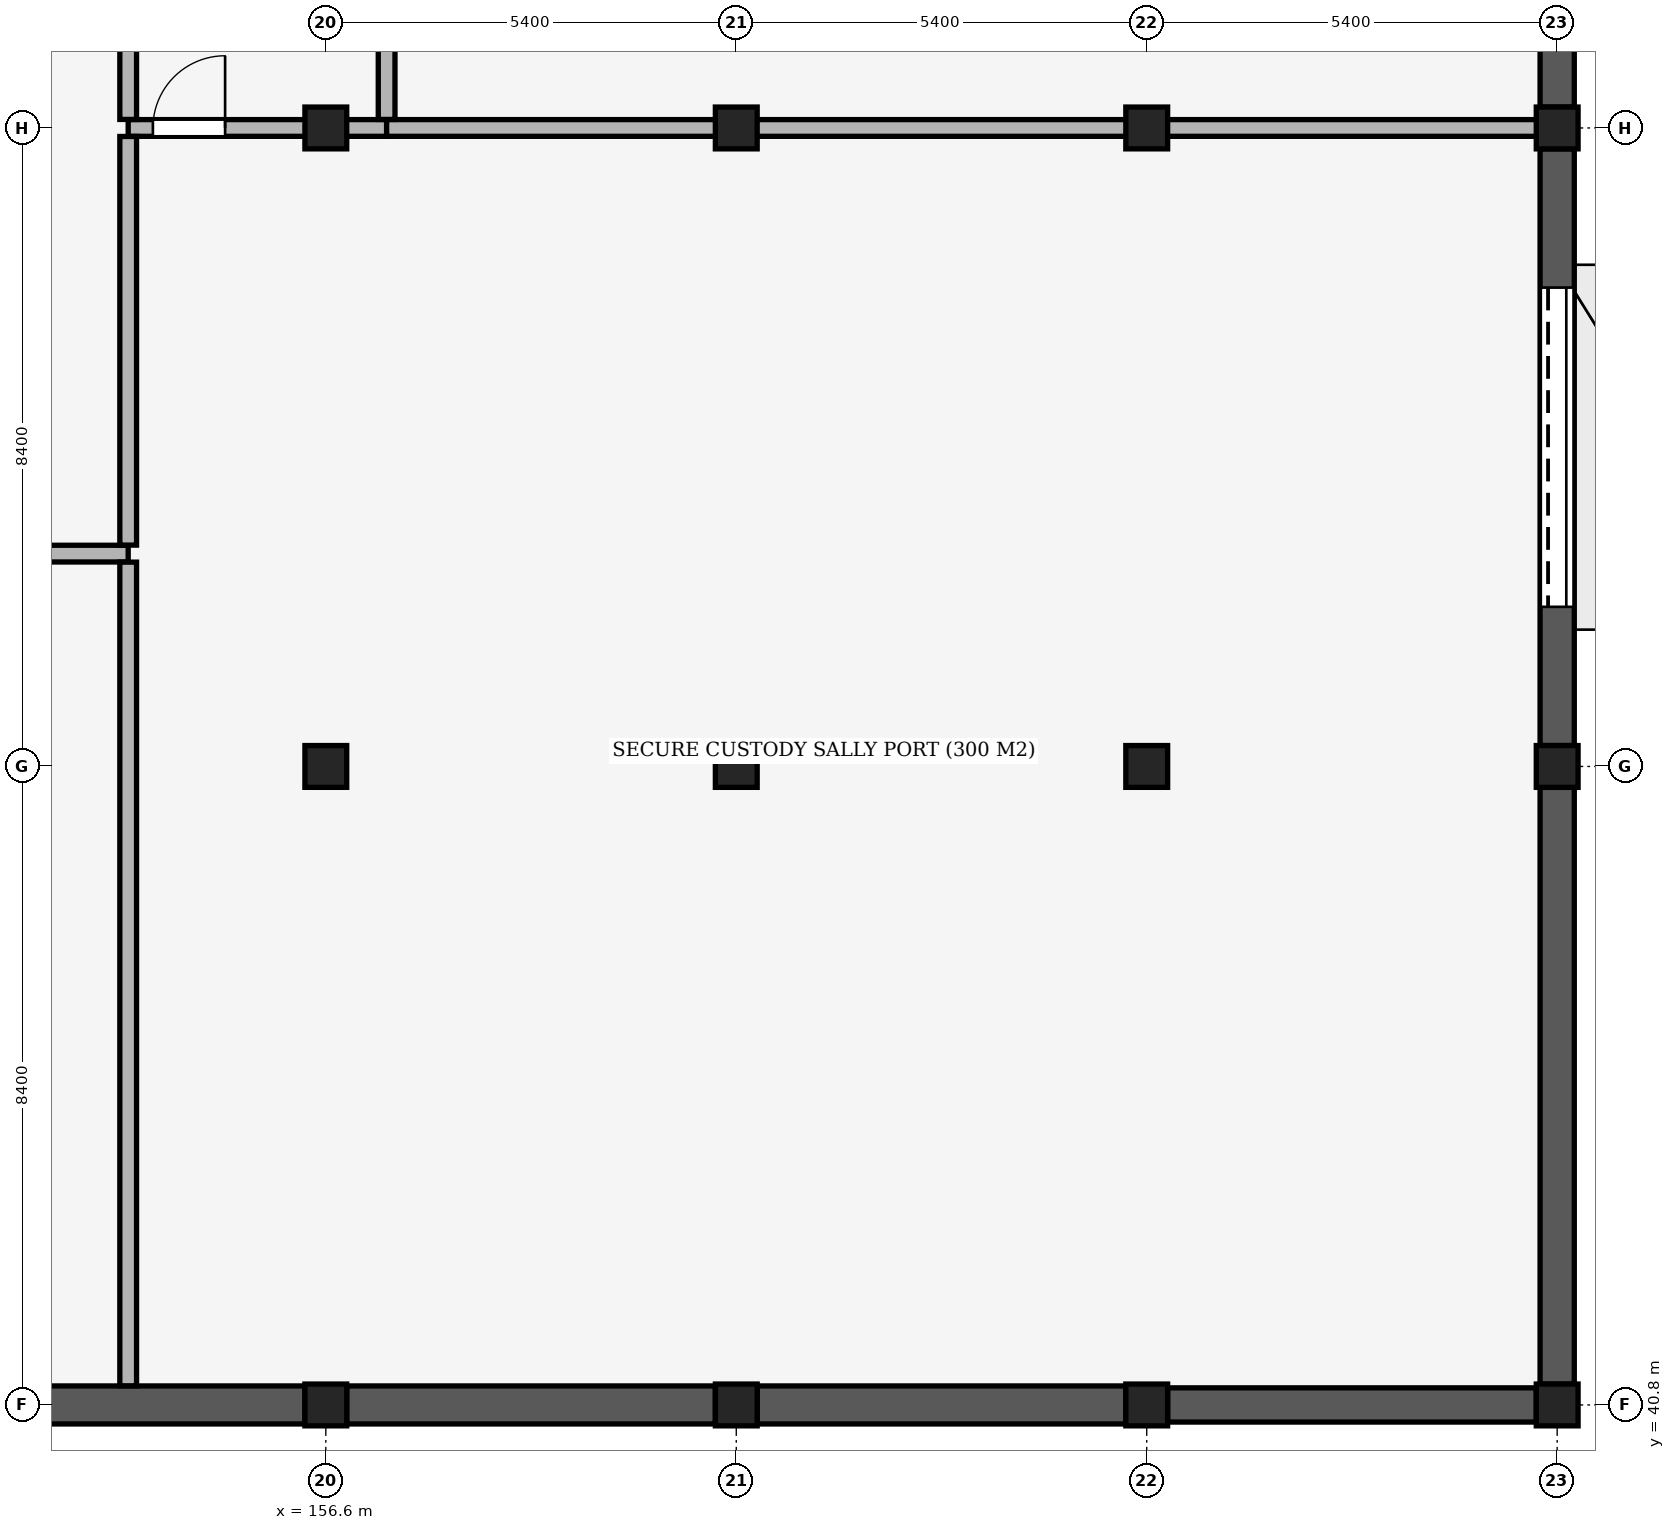
"""IFC4 building model, lengths in metres.
Left out: names, types, materials, properties, quantities, classifications, styles, units other than length and angle.
Written with IfcOpenShell. Run it as: python <this file> out.ifc"""

import sys

from ifc_helpers import new_model, si_unit, direction, frame, frame_2d, origin, origin_2d, place, context, subcontext, project, spatial, rectangle, extrude, element, fill, save


model = new_model("IFC4")
c1 = context("Model", 3, precision=1e-05, world=origin(), true_north=direction((0.0, 1.0)))
c2 = subcontext(c1, "Body", "Model", "MODEL_VIEW")
j1 = project(units=[si_unit("LENGTHUNIT", "METRE"), si_unit("PLANEANGLEUNIT", "RADIAN")], contexts=[c1])
p1 = place(None, origin())
s1 = spatial("IfcSite", under=j1, at=p1, CompositionType="ELEMENT")
p2 = place(p1, origin())
s2 = spatial("IfcBuilding", under=s1, at=p2, CompositionType="ELEMENT")
p3 = place(p2, frame((0.0, 0.0, -4.8)))
s3 = spatial("IfcBuildingStorey", under=s2, at=p3, CompositionType="ELEMENT", Elevation=-4.8)
for number, where, z_axis, x_axis in (
    (1, (156.6, 40.8, 0.0), (0.0, 0.0, 1.0), (1.0, 0.0, 0.0)),
    (2, (156.6, 49.2, 0.0), (0.0, 0.0, 1.0), (1.0, 0.0, 0.0)),
    (3, (156.6, 57.6, 0.0), (0.0, 0.0, 1.0), (1.0, 0.0, 0.0)),
    (4, (162.0, 40.8, 0.0), (0.0, 0.0, 1.0), (1.0, 0.0, 0.0)),
    (5, (162.0, 49.2, 0.0), (0.0, 0.0, 1.0), (1.0, 0.0, 0.0)),
    (6, (162.0, 57.6, 0.0), (0.0, 0.0, 1.0), (1.0, 0.0, 0.0)),
    (7, (167.4, 40.8, 0.0), (0.0, 0.0, 1.0), (1.0, 0.0, 0.0)),
    (8, (167.4, 49.2, 0.0), (0.0, 0.0, 1.0), (1.0, 0.0, 0.0)),
    (9, (167.4, 57.6, 0.0), (0.0, 0.0, 1.0), (1.0, 0.0, 0.0)),
    (10, (172.8, 40.8, 0.0), (0.0, 0.0, 1.0), (1.0, 0.0, 0.0)),
    (11, (172.8, 49.2, 0.0), (0.0, 0.0, 1.0), (1.0, 0.0, 0.0)),
    (12, (172.8, 57.6, 0.0), (0.0, 0.0, 1.0), (1.0, 0.0, 0.0)),
):
    element("IfcColumn", number, at=place(p3, frame(where, z_axis=z_axis, x_axis=x_axis)), inside=s3, PredefinedType="COLUMN", context=c2, shape_type="SweptSolid", body=[
        extrude(rectangle(XDim=0.55, YDim=0.55, at=origin_2d()), origin(), (0.0, 0.0, 1.0), 4.8),
    ])
p4 = place(p3, frame((172.8, 65.725, 0.0), z_axis=(0.0, 0.0, 1.0), x_axis=(0.0, -1.0, 0.0)))
e13 = element("IfcWall", 13, at=p4, inside=s3, PredefinedType="USERDEFINED", context=c2, shape_type="SweptSolid", body=[
    extrude(rectangle(XDim=7.85, YDim=0.45, at=frame_2d((3.925, 0.0))), origin(), (0.0, 0.0, 1.0), 3.7),
])
p5 = place(p3, frame((172.8, 57.325, 0.0), z_axis=(0.0, 0.0, 1.0), x_axis=(0.0, -1.0, 0.0)))
e14 = element("IfcWall", 14, at=p5, inside=s3, PredefinedType="USERDEFINED", context=c2, shape_type="SweptSolid", body=[
    extrude(rectangle(XDim=7.85, YDim=0.45, at=frame_2d((3.925, 0.0))), origin(), (0.0, 0.0, 1.0), 3.7),
])
p6 = place(p5, frame((1.825, 0.0, 0.0)))
e15 = element("IfcOpeningElement", 15, at=p6, cuts=e14, PredefinedType="OPENING", context=c2, shape_type="SweptSolid", body=[
    extrude(rectangle(XDim=4.2, YDim=3.65, at=frame_2d((2.1, 1.825))), frame((0.0, 0.24, 0.0), z_axis=(0.0, -1.0, 0.0), x_axis=(1.0, 0.0, 0.0)), (0.0, 0.0, 1.0), 0.48),
])
p7 = place(p3, frame((172.8, 48.925, 0.0), z_axis=(0.0, 0.0, 1.0), x_axis=(0.0, -1.0, 0.0)))
e16 = element("IfcWall", 16, at=p7, inside=s3, PredefinedType="USERDEFINED", context=c2, shape_type="SweptSolid", body=[
    extrude(rectangle(XDim=7.85, YDim=0.45, at=frame_2d((3.925, 0.0))), origin(), (0.0, 0.0, 1.0), 3.7),
])
p8 = place(p3, frame((172.525, 40.8, 0.0), z_axis=(0.0, 0.0, 1.0), x_axis=(-1.0, 0.0, 0.0)))
e17 = element("IfcWall", 17, at=p8, inside=s3, PredefinedType="USERDEFINED", context=c2, shape_type="SweptSolid", body=[
    extrude(rectangle(XDim=4.85, YDim=0.45, at=frame_2d((2.425, 0.0))), origin(), (0.0, 0.0, 1.0), 3.9),
])
for number, where, z_axis, x_axis in (
    (18, (167.125, 40.8, 0.0), (0.0, 0.0, 1.0), (-1.0, 0.0, 0.0)),
    (19, (161.725, 40.8, 0.0), (0.0, 0.0, 1.0), (-1.0, 0.0, 0.0)),
):
    element("IfcWall", number, at=place(p3, frame(where, z_axis=z_axis, x_axis=x_axis)), inside=s3, PredefinedType="USERDEFINED", context=c2, shape_type="SweptSolid", body=[
        extrude(rectangle(XDim=4.85, YDim=0.5, at=frame_2d((2.425, 0.0))), origin(), (0.0, 0.0, 1.0), 3.9),
    ])
p9 = place(p3, frame((156.325, 40.8, 0.0), z_axis=(0.0, 0.0, 1.0), x_axis=(-1.0, 0.0, 0.0)))
e20 = element("IfcWall", 20, at=p9, inside=s3, PredefinedType="USERDEFINED", context=c2, shape_type="SweptSolid", body=[
    extrude(rectangle(XDim=4.85, YDim=0.5, at=frame_2d((2.425, 0.0))), origin(), (0.0, 0.0, 1.0), 3.9),
])
p10 = place(p3, frame((138.4, 52.0, 0.0), z_axis=(0.0, 0.0, 1.0), x_axis=(1.0, 0.0, 0.0)))
e21 = element("IfcWall", 21, at=p10, inside=s3, PredefinedType="PARTITIONING", context=c2, shape_type="SweptSolid", body=[
    extrude(rectangle(XDim=15.6, YDim=0.22, at=frame_2d((7.8, 0.0))), origin(), (0.0, 0.0, 1.0), 3.7),
])
p11 = place(p3, frame((154.0, 57.6, 0.0), z_axis=(0.0, 0.0, 1.0), x_axis=(1.0, 0.0, 0.0)))
e22 = element("IfcWall", 22, at=p11, inside=s3, PredefinedType="PARTITIONING", context=c2, shape_type="SweptSolid", body=[
    extrude(rectangle(XDim=3.4, YDim=0.22, at=frame_2d((1.7, 0.0))), origin(), (0.0, 0.0, 1.0), 3.7),
])
p12 = place(p11, frame((0.325, 0.0, 0.0)))
e23 = element("IfcOpeningElement", 23, at=p12, cuts=e22, PredefinedType="OPENING", context=c2, shape_type="SweptSolid", body=[
    extrude(rectangle(XDim=0.95, YDim=2.1, at=frame_2d((0.475, 1.05))), frame((0.0, 0.125, 0.0), z_axis=(0.0, -1.0, 0.0), x_axis=(1.0, 0.0, 0.0)), (0.0, 0.0, 1.0), 0.25),
])
p13 = place(p3, frame((157.4, 57.6, 0.0), z_axis=(0.0, 0.0, 1.0), x_axis=(1.0, 0.0, 0.0)))
e24 = element("IfcWall", 24, at=p13, inside=s3, PredefinedType="PARTITIONING", context=c2, shape_type="SweptSolid", body=[
    extrude(rectangle(XDim=15.344, YDim=0.22, at=frame_2d((7.672, 0.0))), origin(), (0.0, 0.0, 1.0), 3.7),
])
p14 = place(p3, frame((154.0, 41.052, 0.0), z_axis=(0.0, 0.0, 1.0), x_axis=(0.0, 1.0, 0.0)))
e25 = element("IfcWall", 25, at=p14, inside=s3, PredefinedType="PARTITIONING", context=c2, shape_type="SweptSolid", body=[
    extrude(rectangle(XDim=10.836, YDim=0.22, at=frame_2d((5.418, 0.0))), origin(), (0.0, 0.0, 1.0), 3.9),
])
p15 = place(p3, frame((154.0, 52.112, 0.0), z_axis=(0.0, 0.0, 1.0), x_axis=(0.0, 1.0, 0.0)))
e26 = element("IfcWall", 26, at=p15, inside=s3, PredefinedType="PARTITIONING", context=c2, shape_type="SweptSolid", body=[
    extrude(rectangle(XDim=5.376, YDim=0.22, at=frame_2d((2.688, 0.0))), origin(), (0.0, 0.0, 1.0), 3.9),
])
p16 = place(p3, frame((154.0, 57.712, 0.0), z_axis=(0.0, 0.0, 1.0), x_axis=(0.0, 1.0, 0.0)))
e27 = element("IfcWall", 27, at=p16, inside=s3, PredefinedType="PARTITIONING", context=c2, shape_type="SweptSolid", body=[
    extrude(rectangle(XDim=4.576, YDim=0.22, at=frame_2d((2.288, 0.0))), origin(), (0.0, 0.0, 1.0), 3.9),
])
p17 = place(p3, frame((157.4, 57.712, 0.0), z_axis=(0.0, 0.0, 1.0), x_axis=(0.0, 1.0, 0.0)))
e28 = element("IfcWall", 28, at=p17, inside=s3, PredefinedType="PARTITIONING", context=c2, shape_type="SweptSolid", body=[
    extrude(rectangle(XDim=8.176, YDim=0.22, at=frame_2d((4.088, 0.0))), origin(), (0.0, 0.0, 1.0), 3.9),
])
p18 = place(p17, frame((3.563, 0.0, 0.0)))
e29 = element("IfcOpeningElement", 29, at=p18, cuts=e28, PredefinedType="OPENING", context=c2, shape_type="SweptSolid", body=[
    extrude(rectangle(XDim=1.05, YDim=2.15, at=frame_2d((0.525, 1.075))), frame((0.0, 0.125, 0.0), z_axis=(0.0, -1.0, 0.0), x_axis=(1.0, 0.0, 0.0)), (0.0, 0.0, 1.0), 0.25),
])
p19 = place(p6, origin())
e30 = element("IfcDoor", 30, at=p19, inside=s3, OperationType="ROLLINGUP", PredefinedType="GATE", context=c2, shape_type="SweptSolid", body=[
    extrude(rectangle(XDim=4.2, YDim=3.65, at=frame_2d((2.1, 1.825))), frame((0.0, 0.025, 0.0), z_axis=(0.0, -1.0, 0.0), x_axis=(1.0, 0.0, 0.0)), (0.0, 0.0, 1.0), 0.05),
])
fill(e15, e30)
p20 = place(p12, origin())
e31 = element("IfcDoor", 31, at=p20, inside=s3, OperationType="SINGLE_SWING_RIGHT", PredefinedType="DOOR", context=c2, shape_type="SweptSolid", body=[
    extrude(rectangle(XDim=0.95, YDim=2.1, at=frame_2d((0.475, 1.05))), frame((0.0, 0.025, 0.0), z_axis=(0.0, -1.0, 0.0), x_axis=(1.0, 0.0, 0.0)), (0.0, 0.0, 1.0), 0.05),
])
fill(e23, e31)
save(model, sys.argv[1])
